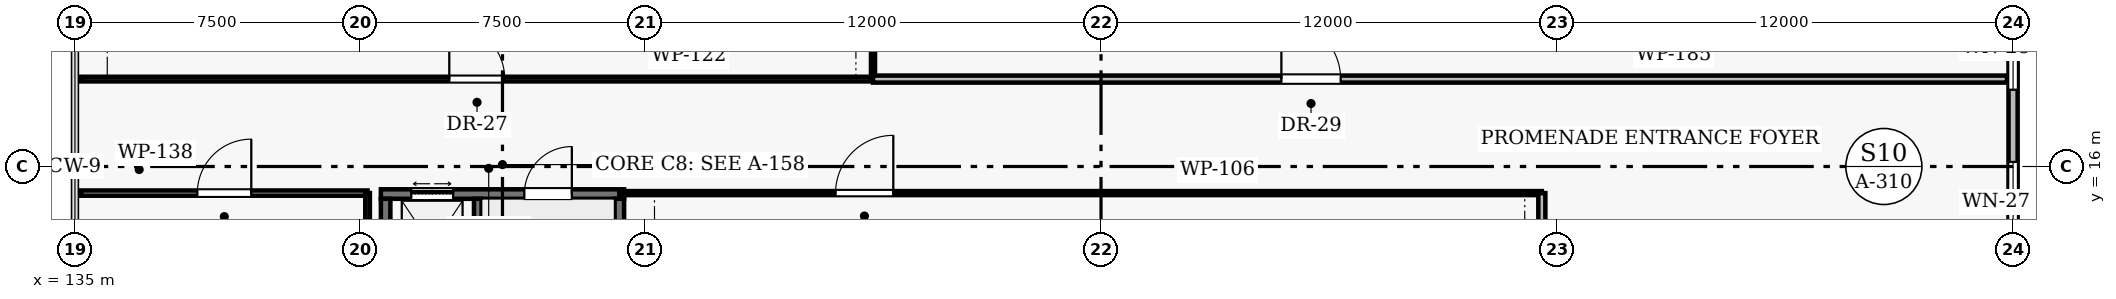
"""IFC4 building model, lengths in metres.
Left out: names, types, materials, properties, quantities, classifications, styles, units other than length and angle.
Written with IfcOpenShell. Run it as: python <this file> out.ifc"""

import sys

from ifc_helpers import new_model, si_unit, direction, frame, frame_2d, origin, place, context, subcontext, project, spatial, rectangle, extrude, element, fill, save


model = new_model("IFC4")
c1 = context("Model", 3, precision=1e-05, world=origin(), true_north=direction((0.0, 1.0)))
c2 = subcontext(c1, "Body", "Model", "MODEL_VIEW")
j1 = project(units=[si_unit("LENGTHUNIT", "METRE"), si_unit("PLANEANGLEUNIT", "RADIAN")], contexts=[c1])
p1 = place(None, origin())
s1 = spatial("IfcSite", under=j1, at=p1, CompositionType="ELEMENT")
p2 = place(p1, origin())
s2 = spatial("IfcBuilding", under=s1, at=p2, CompositionType="ELEMENT")
p3 = place(p2, origin())
s3 = spatial("IfcBuildingStorey", under=s2, at=p3, CompositionType="ELEMENT", Elevation=0.0)
p4 = place(p3, frame((186.0, 8.22, 0.0), z_axis=(0.0, 0.0, 1.0), x_axis=(0.0, 1.0, 0.0)))
e1 = element("IfcWall", 1, at=p4, inside=s3, PredefinedType="SOLIDWALL", context=c2, shape_type="SweptSolid", body=[
    extrude(rectangle(XDim=15.56, YDim=0.24, at=frame_2d((7.78, 0.0))), origin(), (0.0, 0.0, 1.0), 3.581),
])
p5 = place(p4, frame((1.8, 0.0, 1.05)))
e2 = element("IfcOpeningElement", 2, at=p5, cuts=e1, PredefinedType="OPENING", context=c2, shape_type="SweptSolid", body=[
    extrude(rectangle(XDim=2.0, YDim=1.5, at=frame_2d((1.0, 0.75))), frame((0.0, 0.13, 0.0), z_axis=(0.0, -1.0, 0.0), x_axis=(1.0, 0.0, 0.0)), (0.0, 0.0, 1.0), 0.26),
])
p6 = place(p4, frame((5.8, 0.0, 1.05)))
e3 = element("IfcOpeningElement", 3, at=p6, cuts=e1, PredefinedType="OPENING", context=c2, shape_type="SweptSolid", body=[
    extrude(rectangle(XDim=2.1, YDim=1.5, at=frame_2d((1.05, 0.75))), frame((0.0, 0.13, 0.0), z_axis=(0.0, -1.0, 0.0), x_axis=(1.0, 0.0, 0.0)), (0.0, 0.0, 1.0), 0.26),
])
p7 = place(p4, frame((9.8, 0.0, 1.05)))
e4 = element("IfcOpeningElement", 4, at=p7, cuts=e1, PredefinedType="OPENING", context=c2, shape_type="SweptSolid", body=[
    extrude(rectangle(XDim=2.2, YDim=1.6, at=frame_2d((1.1, 0.8))), frame((0.0, 0.13, 0.0), z_axis=(0.0, -1.0, 0.0), x_axis=(1.0, 0.0, 0.0)), (0.0, 0.0, 1.0), 0.26),
])
p8 = place(p3, frame((143.05, 15.275, 0.0), z_axis=(0.0, 0.0, 1.0), x_axis=(1.0, 0.0, 0.0)))
e5 = element("IfcWall", 5, at=p8, inside=s3, PredefinedType="SHEAR", context=c2, shape_type="SweptSolid", body=[
    extrude(rectangle(XDim=6.4, YDim=0.25, at=frame_2d((3.2, 0.0))), origin(), (0.0, 0.0, 1.0), 4.5),
])
p9 = place(p8, frame((0.8, 0.0, 0.0)))
e6 = element("IfcOpeningElement", 6, at=p9, cuts=e5, PredefinedType="OPENING", context=c2, shape_type="SweptSolid", body=[
    extrude(rectangle(XDim=1.1, YDim=2.15, at=frame_2d((0.55, 1.075))), frame((0.0, 0.135, 0.0), z_axis=(0.0, -1.0, 0.0), x_axis=(1.0, 0.0, 0.0)), (0.0, 0.0, 1.0), 0.27),
])
p10 = place(p8, frame((3.775, 0.0, 0.0)))
e7 = element("IfcOpeningElement", 7, at=p10, cuts=e5, PredefinedType="OPENING", context=c2, shape_type="SweptSolid", body=[
    extrude(rectangle(XDim=1.25, YDim=2.15, at=frame_2d((0.625, 1.075))), frame((0.0, 0.135, 0.0), z_axis=(0.0, -1.0, 0.0), x_axis=(1.0, 0.0, 0.0)), (0.0, 0.0, 1.0), 0.27),
])
for number, where, z_axis, x_axis in (
    (8, (143.175, 8.45, 0.0), (0.0, 0.0, 1.0), (0.0, 1.0, 0.0)),
    (9, (149.325, 8.45, 0.0), (0.0, 0.0, 1.0), (0.0, 1.0, 0.0)),
):
    element("IfcWall", number, at=place(p3, frame(where, z_axis=z_axis, x_axis=x_axis)), inside=s3, PredefinedType="SHEAR", context=c2, shape_type="SweptSolid", body=[
        extrude(rectangle(XDim=6.7, YDim=0.25, at=frame_2d((3.35, 0.0))), origin(), (0.0, 0.0, 1.0), 4.5),
    ])
p11 = place(p3, frame((145.6, 8.45, 0.0), z_axis=(0.0, 0.0, 1.0), x_axis=(0.0, 1.0, 0.0)))
e10 = element("IfcWall", 10, at=p11, inside=s3, PredefinedType="SHEAR", context=c2, shape_type="SweptSolid", body=[
    extrude(rectangle(XDim=6.7, YDim=0.2, at=frame_2d((3.35, 0.0))), origin(), (0.0, 0.0, 1.0), 4.5),
])
p12 = place(p3, frame((135.16, 15.3, 0.0), z_axis=(0.0, 0.0, 1.0), x_axis=(1.0, 0.0, 0.0)))
e11 = element("IfcWall", 11, at=p12, inside=s3, PredefinedType="PARTITIONING", context=c2, shape_type="SweptSolid", body=[
    extrude(rectangle(XDim=7.54, YDim=0.138, at=frame_2d((3.77, 0.0))), origin(), (0.0, 0.0, 1.0), 3.7),
])
p13 = place(p12, frame((3.06, 0.0, 0.0)))
e12 = element("IfcOpeningElement", 12, at=p13, cuts=e11, PredefinedType="OPENING", context=c2, shape_type="SweptSolid", body=[
    extrude(rectangle(XDim=1.42, YDim=2.18, at=frame_2d((0.71, 1.09))), frame((0.0, 0.079, 0.0), z_axis=(0.0, -1.0, 0.0), x_axis=(1.0, 0.0, 0.0)), (0.0, 0.0, 1.0), 0.158),
])
p14 = place(p3, frame((142.7, 8.05, 0.0), z_axis=(0.0, 0.0, 1.0), x_axis=(0.0, 1.0, 0.0)))
e13 = element("IfcWall", 13, at=p14, inside=s3, PredefinedType="PARTITIONING", context=c2, shape_type="SweptSolid", body=[
    extrude(rectangle(XDim=7.25, YDim=0.122, at=frame_2d((3.625, 0.0))), origin(), (0.0, 0.0, 1.0), 3.581),
])
p15 = place(p3, frame((135.16, 18.3, 0.0), z_axis=(0.0, 0.0, 1.0), x_axis=(1.0, 0.0, 0.0)))
e14 = element("IfcWall", 14, at=p15, inside=s3, PredefinedType="PARTITIONING", context=c2, shape_type="SweptSolid", body=[
    extrude(rectangle(XDim=20.84, YDim=0.122, at=frame_2d((10.42, 0.0))), origin(), (0.0, 0.0, 1.0), 3.7),
])
p16 = place(p15, frame((9.69, 0.0, 0.0)))
e15 = element("IfcOpeningElement", 15, at=p16, cuts=e14, PredefinedType="OPENING", context=c2, shape_type="SweptSolid", body=[
    extrude(rectangle(XDim=1.46, YDim=2.2, at=frame_2d((0.73, 1.1))), frame((0.0, 0.071, 0.0), z_axis=(0.0, -1.0, 0.0), x_axis=(1.0, 0.0, 0.0)), (0.0, 0.0, 1.0), 0.142),
])
p17 = place(p3, frame((156.0, 18.3, 0.0), z_axis=(0.0, 0.0, 1.0), x_axis=(0.0, 1.0, 0.0)))
e16 = element("IfcWall", 16, at=p17, inside=s3, PredefinedType="PARTITIONING", context=c2, shape_type="SweptSolid", body=[
    extrude(rectangle(XDim=5.62, YDim=0.106, at=frame_2d((2.81, 0.0))), origin(), (0.0, 0.0, 1.0), 3.7),
])
p18 = place(p3, frame((149.325, 15.3, 0.0), z_axis=(0.0, 0.0, 1.0), x_axis=(1.0, 0.0, 0.0)))
e17 = element("IfcWall", 17, at=p18, inside=s3, PredefinedType="PARTITIONING", context=c2, shape_type="SweptSolid", body=[
    extrude(rectangle(XDim=24.275, YDim=0.106, at=frame_2d((12.138, 0.0))), origin(), (0.0, 0.0, 1.0), 3.7),
])
p19 = place(p18, frame((5.689, 0.0, 0.0)))
e18 = element("IfcOpeningElement", 18, at=p19, cuts=e17, PredefinedType="OPENING", context=c2, shape_type="SweptSolid", body=[
    extrude(rectangle(XDim=1.52, YDim=2.18, at=frame_2d((0.76, 1.09))), frame((0.0, 0.063, 0.0), z_axis=(0.0, -1.0, 0.0), x_axis=(1.0, 0.0, 0.0)), (0.0, 0.0, 1.0), 0.126),
])
p20 = place(p3, frame((173.6, 8.05, 0.0), z_axis=(0.0, 0.0, 1.0), x_axis=(0.0, 1.0, 0.0)))
e19 = element("IfcWall", 19, at=p20, inside=s3, PredefinedType="PARTITIONING", context=c2, shape_type="SweptSolid", body=[
    extrude(rectangle(XDim=7.25, YDim=0.185, at=frame_2d((3.625, 0.0))), origin(), (0.0, 0.0, 1.0), 3.581),
])
p21 = place(p3, frame((156.0, 18.3, 0.0), z_axis=(0.0, 0.0, 1.0), x_axis=(1.0, 0.0, 0.0)))
e20 = element("IfcWall", 20, at=p21, inside=s3, PredefinedType="PARTITIONING", context=c2, shape_type="SweptSolid", body=[
    extrude(rectangle(XDim=29.84, YDim=0.185, at=frame_2d((14.92, 0.0))), origin(), (0.0, 0.0, 1.0), 3.7),
])
p22 = place(p21, frame((10.746, 0.0, 0.0)))
e21 = element("IfcOpeningElement", 21, at=p22, cuts=e20, PredefinedType="OPENING", context=c2, shape_type="SweptSolid", body=[
    extrude(rectangle(XDim=1.56, YDim=2.2, at=frame_2d((0.78, 1.1))), frame((0.0, 0.103, 0.0), z_axis=(0.0, -1.0, 0.0), x_axis=(1.0, 0.0, 0.0)), (0.0, 0.0, 1.0), 0.205),
])
p23 = place(p6, origin())
e22 = element("IfcWindow", 22, at=p23, inside=s3, PartitioningType="SINGLE_PANEL", PredefinedType="WINDOW", context=c2, shape_type="SweptSolid", body=[
    extrude(rectangle(XDim=2.1, YDim=1.5, at=frame_2d((1.05, 0.75))), frame((0.0, 0.03, 0.0), z_axis=(0.0, -1.0, 0.0), x_axis=(1.0, 0.0, 0.0)), (0.0, 0.0, 1.0), 0.06),
])
fill(e3, e22)
p24 = place(p7, origin())
e23 = element("IfcWindow", 23, at=p24, inside=s3, PartitioningType="SINGLE_PANEL", PredefinedType="WINDOW", context=c2, shape_type="SweptSolid", body=[
    extrude(rectangle(XDim=2.2, YDim=1.6, at=frame_2d((1.1, 0.8))), frame((0.0, 0.03, 0.0), z_axis=(0.0, -1.0, 0.0), x_axis=(1.0, 0.0, 0.0)), (0.0, 0.0, 1.0), 0.06),
])
fill(e4, e23)
p25 = place(p9, origin())
e24 = element("IfcDoor", 24, at=p25, inside=s3, OperationType="DOUBLE_DOOR_SLIDING", PredefinedType="DOOR", context=c2, shape_type="SweptSolid", body=[
    extrude(rectangle(XDim=1.1, YDim=2.15, at=frame_2d((0.55, 1.075))), frame((0.0, 0.025, 0.0), z_axis=(0.0, -1.0, 0.0), x_axis=(1.0, 0.0, 0.0)), (0.0, 0.0, 1.0), 0.05),
])
fill(e6, e24)
p26 = place(p10, origin())
e25 = element("IfcDoor", 25, at=p26, inside=s3, OperationType="SINGLE_SWING_RIGHT", PredefinedType="DOOR", context=c2, shape_type="SweptSolid", body=[
    extrude(rectangle(XDim=1.25, YDim=2.15, at=frame_2d((0.625, 1.075))), frame((0.0, 0.025, 0.0), z_axis=(0.0, -1.0, 0.0), x_axis=(1.0, 0.0, 0.0)), (0.0, 0.0, 1.0), 0.05),
])
fill(e7, e25)
p27 = place(p13, origin())
e26 = element("IfcDoor", 26, at=p27, inside=s3, OperationType="SINGLE_SWING_RIGHT", PredefinedType="DOOR", context=c2, shape_type="SweptSolid", body=[
    extrude(rectangle(XDim=1.42, YDim=2.18, at=frame_2d((0.71, 1.09))), frame((0.0, 0.025, 0.0), z_axis=(0.0, -1.0, 0.0), x_axis=(1.0, 0.0, 0.0)), (0.0, 0.0, 1.0), 0.05),
])
fill(e12, e26)
p28 = place(p16, origin())
e27 = element("IfcDoor", 27, at=p28, inside=s3, OperationType="SINGLE_SWING_LEFT", PredefinedType="DOOR", context=c2, shape_type="SweptSolid", body=[
    extrude(rectangle(XDim=1.46, YDim=2.2, at=frame_2d((0.73, 1.1))), frame((0.0, 0.025, 0.0), z_axis=(0.0, -1.0, 0.0), x_axis=(1.0, 0.0, 0.0)), (0.0, 0.0, 1.0), 0.05),
])
fill(e15, e27)
p29 = place(p19, origin())
e28 = element("IfcDoor", 28, at=p29, inside=s3, OperationType="SINGLE_SWING_RIGHT", PredefinedType="DOOR", context=c2, shape_type="SweptSolid", body=[
    extrude(rectangle(XDim=1.52, YDim=2.18, at=frame_2d((0.76, 1.09))), frame((0.0, 0.025, 0.0), z_axis=(0.0, -1.0, 0.0), x_axis=(1.0, 0.0, 0.0)), (0.0, 0.0, 1.0), 0.05),
])
fill(e18, e28)
p30 = place(p22, origin())
e29 = element("IfcDoor", 29, at=p30, inside=s3, OperationType="SINGLE_SWING_LEFT", PredefinedType="DOOR", context=c2, shape_type="SweptSolid", body=[
    extrude(rectangle(XDim=1.56, YDim=2.2, at=frame_2d((0.78, 1.1))), frame((0.0, 0.025, 0.0), z_axis=(0.0, -1.0, 0.0), x_axis=(1.0, 0.0, 0.0)), (0.0, 0.0, 1.0), 0.05),
])
fill(e21, e29)
save(model, sys.argv[1])
